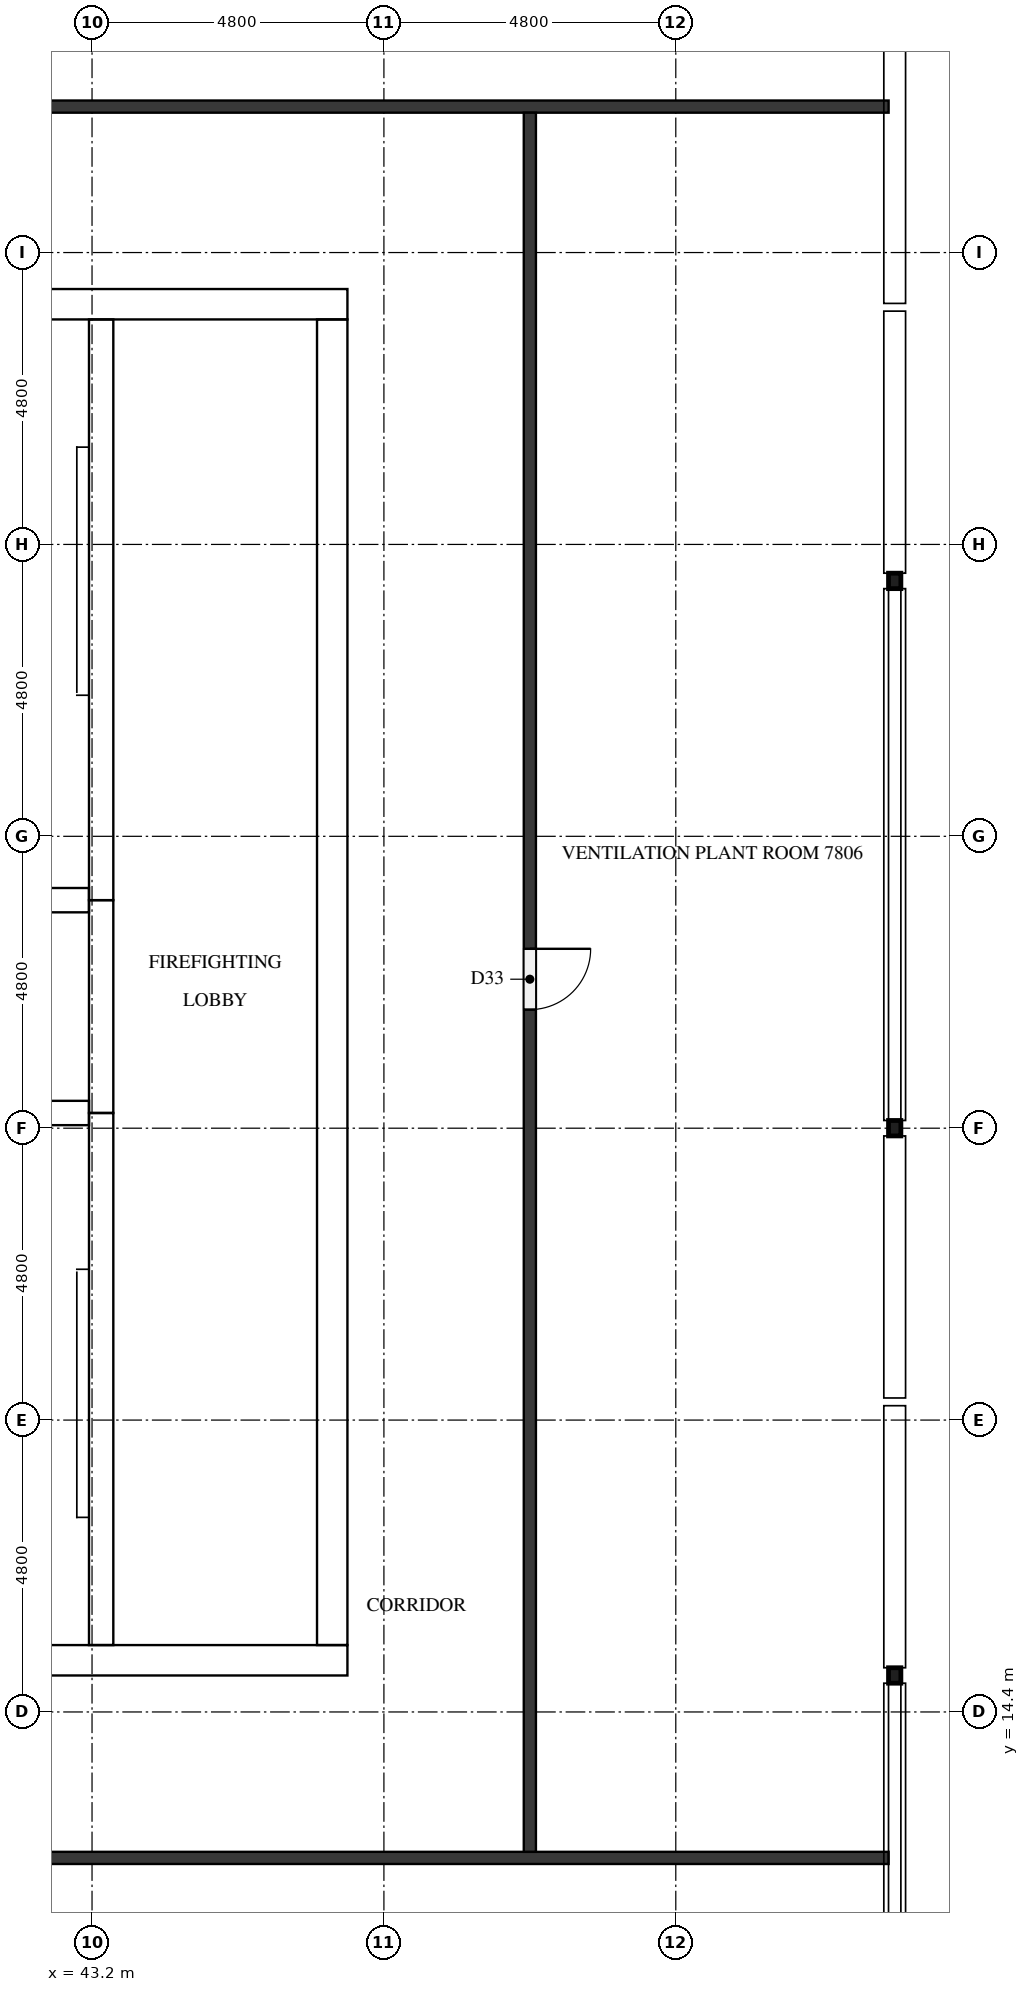
"""IFC4 building model, lengths in metres.
Left out: names, types, materials, properties, quantities, classifications, styles, units other than length and angle.
Written with IfcOpenShell. Run it as: python <this file> out.ifc"""

import sys

from ifc_helpers import new_model, si_unit, direction, frame, frame_2d, origin, origin_2d, place, context, subcontext, project, spatial, rectangle, hollow_rectangle, extrude, element, fill, save


model = new_model("IFC4")
c1 = context("Model", 3, precision=1e-05, world=origin(), true_north=direction((0.0, 1.0)))
c2 = subcontext(c1, "Body", "Model", "MODEL_VIEW")
j1 = project(units=[si_unit("LENGTHUNIT", "METRE"), si_unit("PLANEANGLEUNIT", "RADIAN")], contexts=[c1])
p1 = place(None, origin())
s1 = spatial("IfcSite", under=j1, at=p1, CompositionType="ELEMENT")
p2 = place(p1, origin())
s2 = spatial("IfcBuilding", under=s1, at=p2, CompositionType="ELEMENT")
p3 = place(p2, frame((0.0, 0.0, 301.1)))
s3 = spatial("IfcBuildingStorey", under=s2, at=p3, CompositionType="ELEMENT", Elevation=301.1)
p4 = place(p3, frame((15.0, 15.25, 0.0), z_axis=(0.0, 0.0, 1.0), x_axis=(1.0, 0.0, 0.0)))
e1 = element("IfcWall", 1, at=p4, inside=s3, PredefinedType="SHEAR", context=c2, shape_type="SweptSolid", body=[
    extrude(rectangle(XDim=32.4, YDim=0.5, at=frame_2d((16.2, 0.0))), origin(), (0.0, 0.0, 1.0), 4.4),
])
p5 = place(p4, frame((15.3, 0.0, 0.0)))
e2 = element("IfcOpeningElement", 2, at=p5, cuts=e1, PredefinedType="OPENING", context=c2, shape_type="SweptSolid", body=[
    extrude(rectangle(XDim=1.8, YDim=2.1, at=frame_2d((0.9, 1.05))), frame((0.0, 0.26, 0.0), z_axis=(0.0, -1.0, 0.0), x_axis=(1.0, 0.0, 0.0)), (0.0, 0.0, 1.0), 0.52),
])
p6 = place(p3, frame((15.0, 37.55, 0.0), z_axis=(0.0, 0.0, 1.0), x_axis=(1.0, 0.0, 0.0)))
e3 = element("IfcWall", 3, at=p6, inside=s3, PredefinedType="SHEAR", context=c2, shape_type="SweptSolid", body=[
    extrude(rectangle(XDim=32.4, YDim=0.5, at=frame_2d((16.2, 0.0))), origin(), (0.0, 0.0, 1.0), 4.4),
])
p7 = place(p6, frame((15.3, 0.0, 0.0)))
e4 = element("IfcOpeningElement", 4, at=p7, cuts=e3, PredefinedType="OPENING", context=c2, shape_type="SweptSolid", body=[
    extrude(rectangle(XDim=1.8, YDim=2.1, at=frame_2d((0.9, 1.05))), frame((0.0, 0.26, 0.0), z_axis=(0.0, -1.0, 0.0), x_axis=(1.0, 0.0, 0.0)), (0.0, 0.0, 1.0), 0.52),
])
p8 = place(p6, frame((1.282, 0.0, 0.0)))
e5 = element("IfcOpeningElement", 5, at=p8, cuts=e3, PredefinedType="OPENING", context=c2, shape_type="SweptSolid", body=[
    extrude(rectangle(XDim=1.0, YDim=2.1, at=frame_2d((0.5, 1.05))), frame((0.0, 0.26, 0.0), z_axis=(0.0, -1.0, 0.0), x_axis=(1.0, 0.0, 0.0)), (0.0, 0.0, 1.0), 0.52),
])
p9 = place(p6, frame((5.082, 0.0, 0.0)))
e6 = element("IfcOpeningElement", 6, at=p9, cuts=e3, PredefinedType="OPENING", context=c2, shape_type="SweptSolid", body=[
    extrude(rectangle(XDim=1.0, YDim=2.1, at=frame_2d((0.5, 1.05))), frame((0.0, 0.26, 0.0), z_axis=(0.0, -1.0, 0.0), x_axis=(1.0, 0.0, 0.0)), (0.0, 0.0, 1.0), 0.52),
])
p10 = place(p3, frame((47.15, 15.5, 0.0), z_axis=(0.0, 0.0, 1.0), x_axis=(0.0, 1.0, 0.0)))
e7 = element("IfcWall", 7, at=p10, inside=s3, PredefinedType="SHEAR", context=c2, shape_type="SweptSolid", body=[
    extrude(rectangle(XDim=21.8, YDim=0.5, at=frame_2d((10.9, 0.0))), origin(), (0.0, 0.0, 1.0), 4.4),
])
p11 = place(p10, frame((10.6, 0.0, 0.0)))
e8 = element("IfcOpeningElement", 8, at=p11, cuts=e7, PredefinedType="OPENING", context=c2, shape_type="SweptSolid", body=[
    extrude(rectangle(XDim=1.2, YDim=2.1, at=frame_2d((0.6, 1.05))), frame((0.0, 0.26, 0.0), z_axis=(0.0, -1.0, 0.0), x_axis=(1.0, 0.0, 0.0)), (0.0, 0.0, 1.0), 0.52),
])
p12 = place(p3, frame((43.35, 15.5, 0.0), z_axis=(0.0, 0.0, 1.0), x_axis=(0.0, 1.0, 0.0)))
e9 = element("IfcWall", 9, at=p12, inside=s3, PredefinedType="SHEAR", context=c2, shape_type="SweptSolid", body=[
    extrude(rectangle(XDim=8.75, YDim=0.4, at=frame_2d((4.375, 0.0))), origin(), (0.0, 0.0, 1.0), 4.4),
])
p13 = place(p12, frame((0.7, 0.0, 0.0)))
e10 = element("IfcOpeningElement", 10, at=p13, cuts=e9, PredefinedType="OPENING", context=c2, shape_type="SweptSolid", body=[
    extrude(rectangle(XDim=1.2, YDim=2.1, at=frame_2d((0.6, 1.05))), frame((0.0, 0.21, 0.0), z_axis=(0.0, -1.0, 0.0), x_axis=(1.0, 0.0, 0.0)), (0.0, 0.0, 1.0), 0.42),
])
p14 = place(p3, frame((43.35, 24.25, 0.0), z_axis=(0.0, 0.0, 1.0), x_axis=(0.0, 1.0, 0.0)))
e11 = element("IfcWall", 11, at=p14, inside=s3, PredefinedType="SHEAR", context=c2, shape_type="SweptSolid", body=[
    extrude(rectangle(XDim=3.5, YDim=0.4, at=frame_2d((1.75, 0.0))), origin(), (0.0, 0.0, 1.0), 4.4),
])
p15 = place(p14, frame((1.2, 0.0, 0.0)))
e12 = element("IfcOpeningElement", 12, at=p15, cuts=e11, PredefinedType="OPENING", context=c2, shape_type="SweptSolid", body=[
    extrude(rectangle(XDim=1.1, YDim=2.1, at=frame_2d((0.55, 1.05))), frame((0.0, 0.21, 0.0), z_axis=(0.0, -1.0, 0.0), x_axis=(1.0, 0.0, 0.0)), (0.0, 0.0, 1.0), 0.42),
])
p16 = place(p3, frame((43.35, 27.75, 0.0), z_axis=(0.0, 0.0, 1.0), x_axis=(0.0, 1.0, 0.0)))
e13 = element("IfcWall", 13, at=p16, inside=s3, PredefinedType="SHEAR", context=c2, shape_type="SweptSolid", body=[
    extrude(rectangle(XDim=9.55, YDim=0.4, at=frame_2d((4.775, 0.0))), origin(), (0.0, 0.0, 1.0), 4.4),
])
p17 = place(p16, frame((7.65, 0.0, 0.0)))
e14 = element("IfcOpeningElement", 14, at=p17, cuts=e13, PredefinedType="OPENING", context=c2, shape_type="SweptSolid", body=[
    extrude(rectangle(XDim=1.2, YDim=2.1, at=frame_2d((0.6, 1.05))), frame((0.0, 0.21, 0.0), z_axis=(0.0, -1.0, 0.0), x_axis=(1.0, 0.0, 0.0)), (0.0, 0.0, 1.0), 0.42),
])
for number, where, z_axis, x_axis in (
    (15, (39.5, 24.25, 0.0), (0.0, 0.0, 1.0), (1.0, 0.0, 0.0)),
    (16, (39.5, 27.75, 0.0), (0.0, 0.0, 1.0), (1.0, 0.0, 0.0)),
):
    element("IfcWall", number, at=place(p3, frame(where, z_axis=z_axis, x_axis=x_axis)), inside=s3, PredefinedType="SHEAR", context=c2, shape_type="SweptSolid", body=[
        extrude(rectangle(XDim=3.65, YDim=0.4, at=frame_2d((1.825, 0.0))), origin(), (0.0, 0.0, 1.0), 4.4),
    ])
for number, where, z_axis, x_axis in (
    (17, (56.4, 15.0, 0.0), (0.0, 0.0, 1.0), (1.0, 0.0, 0.0)),
    (18, (56.4, 24.0, 0.0), (0.0, 0.0, 1.0), (1.0, 0.0, 0.0)),
    (19, (56.4, 33.0, 0.0), (0.0, 0.0, 1.0), (1.0, 0.0, 0.0)),
):
    element("IfcColumn", number, at=place(p3, frame(where, z_axis=z_axis, x_axis=x_axis)), inside=s3, PredefinedType="COLUMN", context=c2, shape_type="SweptSolid", body=[
        extrude(hollow_rectangle(XDim=0.203, YDim=0.254, WallThickness=0.01, InnerFilletRadius=0.004, OuterFilletRadius=0.013, at=origin_2d()), origin(), (0.0, 0.0, 1.0), 4.4),
    ])
p18 = place(p3, frame((56.3, 12.0, 0.0), z_axis=(0.0, 0.0, 1.0), x_axis=(-1.0, 0.0, 0.0)))
e20 = element("IfcWall", 20, at=p18, inside=s3, PredefinedType="PARTITIONING", context=c2, shape_type="SweptSolid", body=[
    extrude(rectangle(XDim=55.0, YDim=0.2, at=frame_2d((27.5, 0.0))), origin(), (0.0, 0.0, 1.0), 4.4),
])
p19 = place(p18, frame((37.75, 0.0, 0.0)))
e21 = element("IfcOpeningElement", 21, at=p19, cuts=e20, PredefinedType="OPENING", context=c2, shape_type="SweptSolid", body=[
    extrude(rectangle(XDim=1.0, YDim=2.1, at=frame_2d((0.5, 1.05))), frame((0.0, 0.11, 0.0), z_axis=(0.0, -1.0, 0.0), x_axis=(1.0, 0.0, 0.0)), (0.0, 0.0, 1.0), 0.22),
])
p20 = place(p18, frame((18.55, 0.0, 0.0)))
e22 = element("IfcOpeningElement", 22, at=p20, cuts=e20, PredefinedType="OPENING", context=c2, shape_type="SweptSolid", body=[
    extrude(rectangle(XDim=1.0, YDim=2.1, at=frame_2d((0.5, 1.05))), frame((0.0, 0.11, 0.0), z_axis=(0.0, -1.0, 0.0), x_axis=(1.0, 0.0, 0.0)), (0.0, 0.0, 1.0), 0.22),
])
p21 = place(p3, frame((1.3, 40.8, 0.0), z_axis=(0.0, 0.0, 1.0), x_axis=(1.0, 0.0, 0.0)))
e23 = element("IfcWall", 23, at=p21, inside=s3, PredefinedType="PARTITIONING", context=c2, shape_type="SweptSolid", body=[
    extrude(rectangle(XDim=55.0, YDim=0.2, at=frame_2d((27.5, 0.0))), origin(), (0.0, 0.0, 1.0), 4.4),
])
p22 = place(p21, frame((13.75, 0.0, 0.0)))
e24 = element("IfcOpeningElement", 24, at=p22, cuts=e23, PredefinedType="OPENING", context=c2, shape_type="SweptSolid", body=[
    extrude(rectangle(XDim=1.0, YDim=2.1, at=frame_2d((0.5, 1.05))), frame((0.0, 0.11, 0.0), z_axis=(0.0, -1.0, 0.0), x_axis=(1.0, 0.0, 0.0)), (0.0, 0.0, 1.0), 0.22),
])
p23 = place(p21, frame((32.95, 0.0, 0.0)))
e25 = element("IfcOpeningElement", 25, at=p23, cuts=e23, PredefinedType="OPENING", context=c2, shape_type="SweptSolid", body=[
    extrude(rectangle(XDim=1.0, YDim=2.1, at=frame_2d((0.5, 1.05))), frame((0.0, 0.11, 0.0), z_axis=(0.0, -1.0, 0.0), x_axis=(1.0, 0.0, 0.0)), (0.0, 0.0, 1.0), 0.22),
])
p24 = place(p3, frame((50.4, 40.7, 0.0), z_axis=(0.0, 0.0, 1.0), x_axis=(0.0, -1.0, 0.0)))
e26 = element("IfcWall", 26, at=p24, inside=s3, PredefinedType="PARTITIONING", context=c2, shape_type="SweptSolid", body=[
    extrude(rectangle(XDim=28.6, YDim=0.2, at=frame_2d((14.3, 0.0))), origin(), (0.0, 0.0, 1.0), 4.4),
])
p25 = place(p24, frame((13.75, 0.0, 0.0)))
e27 = element("IfcOpeningElement", 27, at=p25, cuts=e26, PredefinedType="OPENING", context=c2, shape_type="SweptSolid", body=[
    extrude(rectangle(XDim=1.0, YDim=2.1, at=frame_2d((0.5, 1.05))), frame((0.0, 0.11, 0.0), z_axis=(0.0, -1.0, 0.0), x_axis=(1.0, 0.0, 0.0)), (0.0, 0.0, 1.0), 0.22),
])
p26 = place(p15, origin())
e28 = element("IfcDoor", 28, at=p26, inside=s3, OperationType="DOUBLE_DOOR_SLIDING", PredefinedType="DOOR", context=c2, shape_type="SweptSolid", body=[
    extrude(rectangle(XDim=1.1, YDim=2.1, at=frame_2d((0.55, 1.05))), frame((0.0, 0.025, 0.0), z_axis=(0.0, -1.0, 0.0), x_axis=(1.0, 0.0, 0.0)), (0.0, 0.0, 1.0), 0.05),
])
fill(e12, e28)
p27 = place(p13, origin())
e29 = element("IfcDoor", 29, at=p27, inside=s3, OperationType="SINGLE_SWING_LEFT", PredefinedType="DOOR", context=c2, shape_type="SweptSolid", body=[
    extrude(rectangle(XDim=1.2, YDim=2.1, at=frame_2d((0.6, 1.05))), frame((0.0, 0.025, 0.0), z_axis=(0.0, -1.0, 0.0), x_axis=(1.0, 0.0, 0.0)), (0.0, 0.0, 1.0), 0.05),
])
fill(e10, e29)
p28 = place(p17, origin())
e30 = element("IfcDoor", 30, at=p28, inside=s3, OperationType="SINGLE_SWING_RIGHT", PredefinedType="DOOR", context=c2, shape_type="SweptSolid", body=[
    extrude(rectangle(XDim=1.2, YDim=2.1, at=frame_2d((0.6, 1.05))), frame((0.0, 0.025, 0.0), z_axis=(0.0, -1.0, 0.0), x_axis=(1.0, 0.0, 0.0)), (0.0, 0.0, 1.0), 0.05),
])
fill(e14, e30)
p29 = place(p11, origin())
e31 = element("IfcDoor", 31, at=p29, inside=s3, OperationType="SINGLE_SWING_RIGHT", PredefinedType="DOOR", context=c2, shape_type="SweptSolid", body=[
    extrude(rectangle(XDim=1.2, YDim=2.1, at=frame_2d((0.6, 1.05))), frame((0.0, 0.025, 0.0), z_axis=(0.0, -1.0, 0.0), x_axis=(1.0, 0.0, 0.0)), (0.0, 0.0, 1.0), 0.05),
])
fill(e8, e31)
p30 = place(p25, origin())
e32 = element("IfcDoor", 32, at=p30, inside=s3, OperationType="SINGLE_SWING_LEFT", PredefinedType="DOOR", context=c2, shape_type="SweptSolid", body=[
    extrude(rectangle(XDim=1.0, YDim=2.1, at=frame_2d((0.5, 1.05))), frame((0.0, 0.025, 0.0), z_axis=(0.0, -1.0, 0.0), x_axis=(1.0, 0.0, 0.0)), (0.0, 0.0, 1.0), 0.05),
])
fill(e27, e32)
save(model, sys.argv[1])
